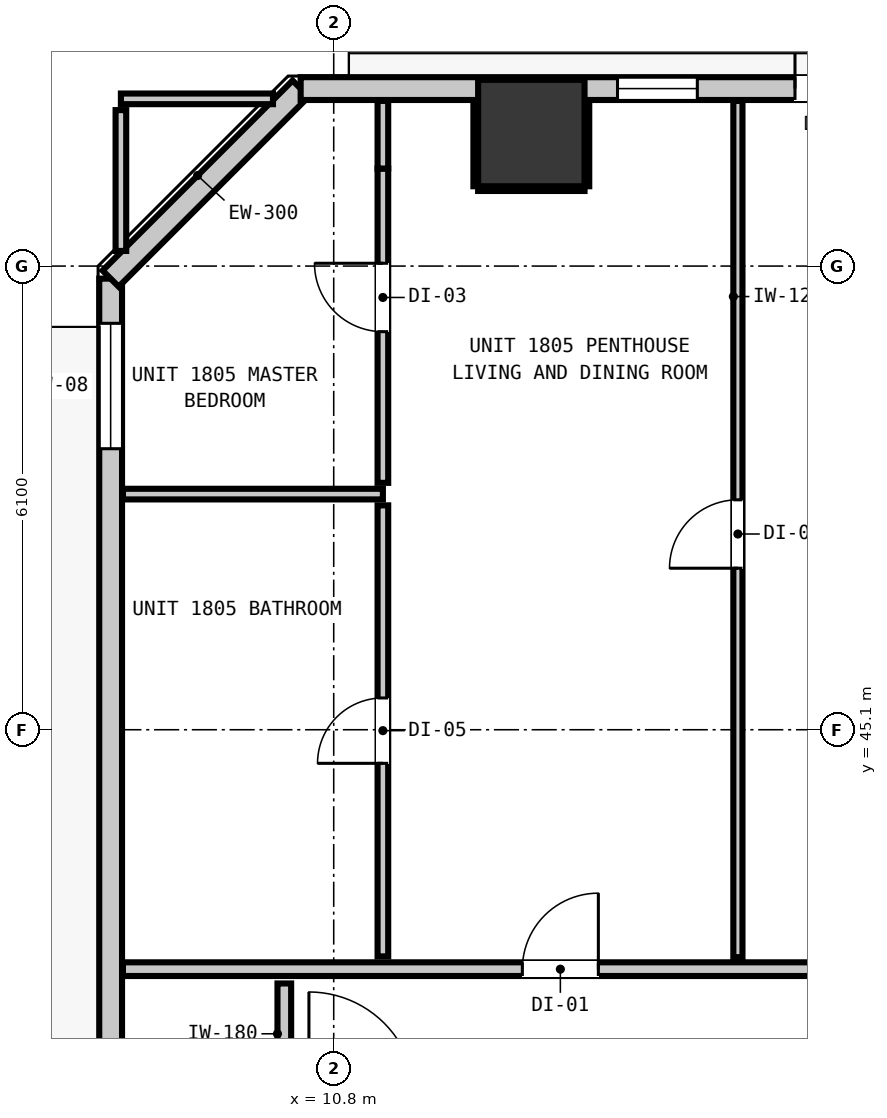
"""IFC4 building model, lengths in metres.
Left out: names, types, materials, properties, quantities, classifications, styles, units other than length and angle.
Written with IfcOpenShell. Run it as: python <this file> out.ifc"""

import sys

from ifc_helpers import new_model, si_unit, direction, frame, frame_2d, origin, origin_2d, place, context, subcontext, project, spatial, rectangle, extrude, element, fill, save


model = new_model("IFC4")
c1 = context("Model", 3, precision=1e-05, world=origin(), true_north=direction((0.0, 1.0)))
c2 = subcontext(c1, "Body", "Model", "MODEL_VIEW")
j1 = project(units=[si_unit("LENGTHUNIT", "METRE"), si_unit("PLANEANGLEUNIT", "RADIAN")], contexts=[c1])
p1 = place(None, origin())
s1 = spatial("IfcSite", under=j1, at=p1, CompositionType="ELEMENT")
p2 = place(p1, origin())
s2 = spatial("IfcBuilding", under=s1, at=p2, CompositionType="ELEMENT")
p3 = place(p2, frame((0.0, 0.0, 65.16)))
s3 = spatial("IfcBuildingStorey", under=s2, at=p3, CompositionType="ELEMENT", Elevation=65.16)
p4 = place(p3, frame((13.4, 52.95, 0.0), z_axis=(0.0, 0.0, 1.0), x_axis=(1.0, 0.0, 0.0)))
e1 = element("IfcColumn", 1, at=p4, inside=s3, PredefinedType="COLUMN", context=c2, shape_type="SweptSolid", body=[
    extrude(rectangle(XDim=1.4, YDim=1.4, at=origin_2d()), origin(), (0.0, 0.0, 1.0), 3.32),
])
p5 = place(p3, frame((7.865, 16.365, 0.0), z_axis=(0.0, 0.0, 1.0), x_axis=(0.0, 1.0, 0.0)))
e2 = element("IfcWall", 2, at=p5, inside=s3, PredefinedType="STANDARD", context=c2, shape_type="SweptSolid", body=[
    extrude(rectangle(XDim=34.67, YDim=0.3, at=frame_2d((17.335, 0.0))), origin(), (0.0, 0.0, 1.0), 3.06),
])
p6 = place(p5, frame((1.251, 0.0, 0.0)))
e3 = element("IfcOpeningElement", 3, at=p6, cuts=e2, PredefinedType="OPENING", context=c2, shape_type="SweptSolid", body=[
    extrude(rectangle(XDim=1.0, YDim=2.15, at=frame_2d((0.5, 1.075))), frame((0.0, 0.16, 0.0), z_axis=(0.0, -1.0, 0.0), x_axis=(1.0, 0.0, 0.0)), (0.0, 0.0, 1.0), 0.32),
])
p7 = place(p5, frame((32.432, 0.0, 0.85)))
e4 = element("IfcOpeningElement", 4, at=p7, cuts=e2, PredefinedType="OPENING", context=c2, shape_type="SweptSolid", body=[
    extrude(rectangle(XDim=1.65, YDim=1.75, at=frame_2d((0.825, 0.875))), frame((0.0, 0.16, 0.0), z_axis=(0.0, -1.0, 0.0), x_axis=(1.0, 0.0, 0.0)), (0.0, 0.0, 1.0), 0.32),
])
p8 = place(p3, frame((7.865, 51.035, 0.0), z_axis=(0.0, 0.0, 1.0), x_axis=(0.707106781187, 0.707106781187, 0.0)))
e5 = element("IfcWall", 5, at=p8, inside=s3, PredefinedType="STANDARD", context=c2, shape_type="SweptSolid", body=[
    extrude(rectangle(XDim=3.536, YDim=0.3, at=frame_2d((1.768, 0.0))), origin(), (0.0, 0.0, 1.0), 3.06),
])
p9 = place(p3, frame((10.365, 53.535, 0.0), z_axis=(0.0, 0.0, 1.0), x_axis=(1.0, 0.0, 0.0)))
e6 = element("IfcWall", 6, at=p9, inside=s3, PredefinedType="STANDARD", context=c2, shape_type="SweptSolid", body=[
    extrude(rectangle(XDim=37.47, YDim=0.3, at=frame_2d((18.735, 0.0))), origin(), (0.0, 0.0, 1.0), 3.06),
])
p10 = place(p9, frame((6.504, 0.0, 0.0)))
e7 = element("IfcOpeningElement", 7, at=p10, cuts=e6, PredefinedType="OPENING", context=c2, shape_type="SweptSolid", body=[
    extrude(rectangle(XDim=1.0, YDim=2.15, at=frame_2d((0.5, 1.075))), frame((0.0, 0.16, 0.0), z_axis=(0.0, -1.0, 0.0), x_axis=(1.0, 0.0, 0.0)), (0.0, 0.0, 1.0), 0.32),
])
p11 = place(p9, frame((4.169, 0.0, 0.85)))
e8 = element("IfcOpeningElement", 8, at=p11, cuts=e6, PredefinedType="OPENING", context=c2, shape_type="SweptSolid", body=[
    extrude(rectangle(XDim=1.05, YDim=1.65, at=frame_2d((0.525, 0.825))), frame((0.0, 0.16, 0.0), z_axis=(0.0, -1.0, 0.0), x_axis=(1.0, 0.0, 0.0)), (0.0, 0.0, 1.0), 0.32),
])
p12 = place(p9, frame((13.81, 0.0, 0.85)))
e9 = element("IfcOpeningElement", 9, at=p12, cuts=e6, PredefinedType="OPENING", context=c2, shape_type="SweptSolid", body=[
    extrude(rectangle(XDim=1.65, YDim=1.75, at=frame_2d((0.825, 0.875))), frame((0.0, 0.16, 0.0), z_axis=(0.0, -1.0, 0.0), x_axis=(1.0, 0.0, 0.0)), (0.0, 0.0, 1.0), 0.32),
])
p13 = place(p9, frame((31.046, 0.0, 0.85)))
e10 = element("IfcOpeningElement", 10, at=p13, cuts=e6, PredefinedType="OPENING", context=c2, shape_type="SweptSolid", body=[
    extrude(rectangle(XDim=1.65, YDim=1.75, at=frame_2d((0.825, 0.875))), frame((0.0, 0.16, 0.0), z_axis=(0.0, -1.0, 0.0), x_axis=(1.0, 0.0, 0.0)), (0.0, 0.0, 1.0), 0.32),
])
p14 = place(p9, frame((27.107, 0.0, 0.85)))
e11 = element("IfcOpeningElement", 11, at=p14, cuts=e6, PredefinedType="OPENING", context=c2, shape_type="SweptSolid", body=[
    extrude(rectangle(XDim=0.58, YDim=1.5, at=frame_2d((0.29, 0.75))), frame((0.0, 0.16, 0.0), z_axis=(0.0, -1.0, 0.0), x_axis=(1.0, 0.0, 0.0)), (0.0, 0.0, 1.0), 0.32),
])
p15 = place(p9, frame((36.056, 0.0, 0.85)))
e12 = element("IfcOpeningElement", 12, at=p15, cuts=e6, PredefinedType="OPENING", context=c2, shape_type="SweptSolid", body=[
    extrude(rectangle(XDim=1.05, YDim=1.65, at=frame_2d((0.525, 0.825))), frame((0.0, 0.16, 0.0), z_axis=(0.0, -1.0, 0.0), x_axis=(1.0, 0.0, 0.0)), (0.0, 0.0, 1.0), 0.32),
])
p16 = place(p3, frame((8.027, 41.95, 0.0), z_axis=(0.0, 0.0, 1.0), x_axis=(1.0, 0.0, 0.0)))
e13 = element("IfcWall", 13, at=p16, inside=s3, PredefinedType="PARTITIONING", context=c2, shape_type="SweptSolid", body=[
    extrude(rectangle(XDim=42.146, YDim=0.18, at=frame_2d((21.073, 0.0))), origin(), (0.0, 0.0, 1.0), 3.06),
])
p17 = place(p16, frame((5.255, 0.0, 0.0)))
e14 = element("IfcOpeningElement", 14, at=p17, cuts=e13, PredefinedType="OPENING", context=c2, shape_type="SweptSolid", body=[
    extrude(rectangle(XDim=1.0, YDim=2.15, at=frame_2d((0.5, 1.075))), frame((0.0, 0.1, 0.0), z_axis=(0.0, -1.0, 0.0), x_axis=(1.0, 0.0, 0.0)), (0.0, 0.0, 1.0), 0.2),
])
p18 = place(p16, frame((16.943, 0.0, 0.0)))
e15 = element("IfcOpeningElement", 15, at=p18, cuts=e13, PredefinedType="OPENING", context=c2, shape_type="SweptSolid", body=[
    extrude(rectangle(XDim=1.0, YDim=2.15, at=frame_2d((0.5, 1.075))), frame((0.0, 0.1, 0.0), z_axis=(0.0, -1.0, 0.0), x_axis=(1.0, 0.0, 0.0)), (0.0, 0.0, 1.0), 0.2),
])
p19 = place(p16, frame((33.708, 0.0, 0.0)))
e16 = element("IfcOpeningElement", 16, at=p19, cuts=e13, PredefinedType="OPENING", context=c2, shape_type="SweptSolid", body=[
    extrude(rectangle(XDim=1.0, YDim=2.15, at=frame_2d((0.5, 1.075))), frame((0.0, 0.1, 0.0), z_axis=(0.0, -1.0, 0.0), x_axis=(1.0, 0.0, 0.0)), (0.0, 0.0, 1.0), 0.2),
])
p20 = place(p3, frame((8.027, 48.2, 0.0), z_axis=(0.0, 0.0, 1.0), x_axis=(1.0, 0.0, 0.0)))
e17 = element("IfcWall", 17, at=p20, inside=s3, PredefinedType="PARTITIONING", context=c2, shape_type="SweptSolid", body=[
    extrude(rectangle(XDim=3.42, YDim=0.14, at=frame_2d((1.71, 0.0))), origin(), (0.0, 0.0, 1.0), 3.06),
])
p21 = place(p3, frame((8.0, 53.4, 0.0), z_axis=(0.0, 0.0, 1.0), x_axis=(1.0, 0.0, 0.0)))
e18 = element("IfcWall", 18, at=p21, inside=s3, PredefinedType="PARTITIONING", context=c2, shape_type="SweptSolid", body=[
    extrude(rectangle(XDim=2.001, YDim=0.14, at=frame_2d((1.0, 0.0))), origin(), (0.0, 0.0, 1.0), 3.06),
])
p22 = place(p3, frame((10.15, 40.438, 0.0), z_axis=(0.0, 0.0, 1.0), x_axis=(0.0, 1.0, 0.0)))
e19 = element("IfcWall", 19, at=p22, inside=s3, PredefinedType="PARTITIONING", context=c2, shape_type="SweptSolid", body=[
    extrude(rectangle(XDim=1.324, YDim=0.18, at=frame_2d((0.662, 0.0))), origin(), (0.0, 0.0, 1.0), 3.06),
])
p23 = place(p3, frame((8.0, 51.399, 0.0), z_axis=(0.0, 0.0, 1.0), x_axis=(0.0, 1.0, 0.0)))
e20 = element("IfcWall", 20, at=p23, inside=s3, PredefinedType="PARTITIONING", context=c2, shape_type="SweptSolid", body=[
    extrude(rectangle(XDim=1.853, YDim=0.14, at=frame_2d((0.927, 0.0))), origin(), (0.0, 0.0, 1.0), 3.06),
])
p24 = place(p3, frame((11.447, 42.118, 0.0), z_axis=(0.0, 0.0, 1.0), x_axis=(0.0, 1.0, 0.0)))
e21 = element("IfcWall", 21, at=p24, inside=s3, PredefinedType="PARTITIONING", context=c2, shape_type="SweptSolid", body=[
    extrude(rectangle(XDim=5.934, YDim=0.14, at=frame_2d((2.967, 0.0))), origin(), (0.0, 0.0, 1.0), 2.445),
])
p25 = place(p24, frame((2.54, 0.0, 0.0)))
e22 = element("IfcOpeningElement", 22, at=p25, cuts=e21, PredefinedType="OPENING", context=c2, shape_type="SweptSolid", body=[
    extrude(rectangle(XDim=0.86, YDim=2.02, at=frame_2d((0.43, 1.01))), frame((0.0, 0.08, 0.0), z_axis=(0.0, -1.0, 0.0), x_axis=(1.0, 0.0, 0.0)), (0.0, 0.0, 1.0), 0.16),
])
p26 = place(p3, frame((11.447, 48.348, 0.0), z_axis=(0.0, 0.0, 1.0), x_axis=(0.0, 1.0, 0.0)))
e23 = element("IfcWall", 23, at=p26, inside=s3, PredefinedType="PARTITIONING", context=c2, shape_type="SweptSolid", body=[
    extrude(rectangle(XDim=4.135, YDim=0.14, at=frame_2d((2.067, 0.0))), origin(), (0.0, 0.0, 1.0), 2.445),
])
p27 = place(p26, frame((1.989, 0.0, 0.0)))
e24 = element("IfcOpeningElement", 24, at=p27, cuts=e23, PredefinedType="OPENING", context=c2, shape_type="SweptSolid", body=[
    extrude(rectangle(XDim=0.9, YDim=2.1, at=frame_2d((0.45, 1.05))), frame((0.0, 0.08, 0.0), z_axis=(0.0, -1.0, 0.0), x_axis=(1.0, 0.0, 0.0)), (0.0, 0.0, 1.0), 0.16),
])
p28 = place(p3, frame((11.447, 52.483, 0.0), z_axis=(0.0, 0.0, 1.0), x_axis=(0.0, 1.0, 0.0)))
e25 = element("IfcWall", 25, at=p28, inside=s3, PredefinedType="PARTITIONING", context=c2, shape_type="SweptSolid", body=[
    extrude(rectangle(XDim=0.89, YDim=0.14, at=frame_2d((0.445, 0.0))), origin(), (0.0, 0.0, 1.0), 3.06),
])
p29 = place(p3, frame((16.118, 42.108, 0.0), z_axis=(0.0, 0.0, 1.0), x_axis=(0.0, 1.0, 0.0)))
e26 = element("IfcWall", 26, at=p29, inside=s3, PredefinedType="PARTITIONING", context=c2, shape_type="SweptSolid", body=[
    extrude(rectangle(XDim=11.265, YDim=0.12, at=frame_2d((5.633, 0.0))), origin(), (0.0, 0.0, 1.0), 3.06),
])
p30 = place(p29, frame((5.117, 0.0, 0.0)))
e27 = element("IfcOpeningElement", 27, at=p30, cuts=e26, PredefinedType="OPENING", context=c2, shape_type="SweptSolid", body=[
    extrude(rectangle(XDim=0.9, YDim=2.1, at=frame_2d((0.45, 1.05))), frame((0.0, 0.07, 0.0), z_axis=(0.0, -1.0, 0.0), x_axis=(1.0, 0.0, 0.0)), (0.0, 0.0, 1.0), 0.14),
])
p31 = place(p3, frame((12.7, 52.218, 0.0), z_axis=(0.0, 0.0, 1.0), x_axis=(1.0, 0.0, 0.0)))
e28 = element("IfcWall", 28, at=p31, inside=s3, PredefinedType="PARTITIONING", context=c2, shape_type="SweptSolid", body=[
    extrude(rectangle(XDim=1.4, YDim=0.06, at=frame_2d((0.7, 0.0))), origin(), (0.0, 0.0, 1.0), 1.45),
])
for number, where, z_axis, x_axis in (
    (29, (12.668, 52.25, 0.0), (0.0, 0.0, 1.0), (0.0, 1.0, 0.0)),
    (30, (14.132, 52.25, 0.0), (0.0, 0.0, 1.0), (0.0, 1.0, 0.0)),
):
    element("IfcWall", number, at=place(p3, frame(where, z_axis=z_axis, x_axis=x_axis)), inside=s3, PredefinedType="PARTITIONING", context=c2, shape_type="SweptSolid", body=[
        extrude(rectangle(XDim=1.12, YDim=0.06, at=frame_2d((0.56, 0.0))), origin(), (0.0, 0.0, 1.0), 1.45),
    ])
p32 = place(p10, origin())
e31 = element("IfcDoor", 31, at=p32, inside=s3, OperationType="SINGLE_SWING_LEFT", PredefinedType="DOOR", context=c2, shape_type="SweptSolid", body=[
    extrude(rectangle(XDim=1.0, YDim=2.15, at=frame_2d((0.5, 1.075))), frame((0.0, 0.025, 0.0), z_axis=(0.0, -1.0, 0.0), x_axis=(1.0, 0.0, 0.0)), (0.0, 0.0, 1.0), 0.05),
])
fill(e7, e31)
p33 = place(p7, origin())
e32 = element("IfcWindow", 32, at=p33, inside=s3, PartitioningType="SINGLE_PANEL", PredefinedType="WINDOW", context=c2, shape_type="SweptSolid", body=[
    extrude(rectangle(XDim=1.65, YDim=1.75, at=frame_2d((0.825, 0.875))), frame((0.0, 0.03, 0.0), z_axis=(0.0, -1.0, 0.0), x_axis=(1.0, 0.0, 0.0)), (0.0, 0.0, 1.0), 0.06),
])
fill(e4, e32)
p34 = place(p11, origin())
e33 = element("IfcWindow", 33, at=p34, inside=s3, PartitioningType="SINGLE_PANEL", PredefinedType="WINDOW", context=c2, shape_type="SweptSolid", body=[
    extrude(rectangle(XDim=1.05, YDim=1.65, at=frame_2d((0.525, 0.825))), frame((0.0, 0.03, 0.0), z_axis=(0.0, -1.0, 0.0), x_axis=(1.0, 0.0, 0.0)), (0.0, 0.0, 1.0), 0.06),
])
fill(e8, e33)
p35 = place(p17, origin())
e34 = element("IfcDoor", 34, at=p35, inside=s3, OperationType="SINGLE_SWING_RIGHT", PredefinedType="DOOR", context=c2, shape_type="SweptSolid", body=[
    extrude(rectangle(XDim=1.0, YDim=2.15, at=frame_2d((0.5, 1.075))), frame((0.0, 0.025, 0.0), z_axis=(0.0, -1.0, 0.0), x_axis=(1.0, 0.0, 0.0)), (0.0, 0.0, 1.0), 0.05),
])
fill(e14, e34)
p36 = place(p25, origin())
e35 = element("IfcDoor", 35, at=p36, inside=s3, OperationType="SINGLE_SWING_LEFT", PredefinedType="DOOR", context=c2, shape_type="SweptSolid", body=[
    extrude(rectangle(XDim=0.86, YDim=2.02, at=frame_2d((0.43, 1.01))), frame((0.0, 0.025, 0.0), z_axis=(0.0, -1.0, 0.0), x_axis=(1.0, 0.0, 0.0)), (0.0, 0.0, 1.0), 0.05),
])
fill(e22, e35)
p37 = place(p27, origin())
e36 = element("IfcDoor", 36, at=p37, inside=s3, OperationType="SINGLE_SWING_RIGHT", PredefinedType="DOOR", context=c2, shape_type="SweptSolid", body=[
    extrude(rectangle(XDim=0.9, YDim=2.1, at=frame_2d((0.45, 1.05))), frame((0.0, 0.025, 0.0), z_axis=(0.0, -1.0, 0.0), x_axis=(1.0, 0.0, 0.0)), (0.0, 0.0, 1.0), 0.05),
])
fill(e24, e36)
p38 = place(p30, origin())
e37 = element("IfcDoor", 37, at=p38, inside=s3, OperationType="SINGLE_SWING_LEFT", PredefinedType="DOOR", context=c2, shape_type="SweptSolid", body=[
    extrude(rectangle(XDim=0.9, YDim=2.1, at=frame_2d((0.45, 1.05))), frame((0.0, 0.025, 0.0), z_axis=(0.0, -1.0, 0.0), x_axis=(1.0, 0.0, 0.0)), (0.0, 0.0, 1.0), 0.05),
])
fill(e27, e37)
save(model, sys.argv[1])
